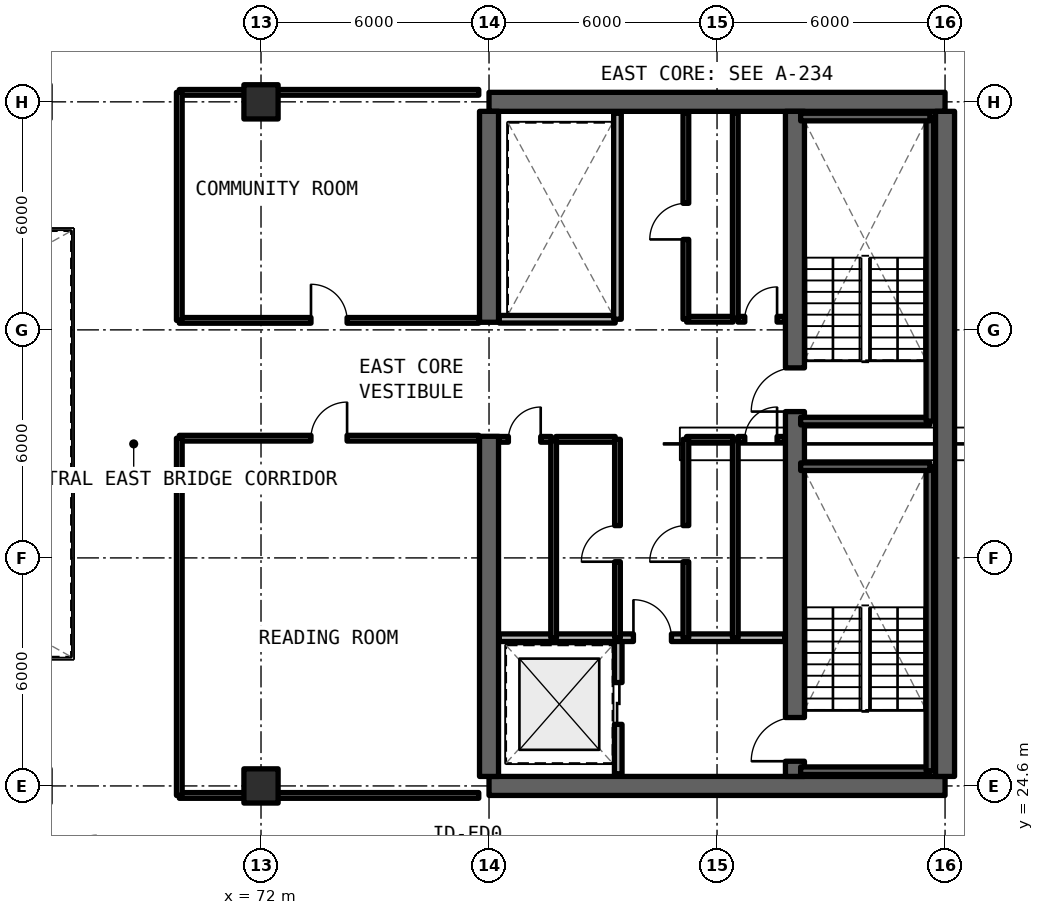
"""IFC4 building model, lengths in metres.
Left out: names, types, materials, properties, quantities, classifications, styles, units other than length and angle.
Written with IfcOpenShell. Run it as: python <this file> out.ifc"""

import sys

from ifc_helpers import new_model, si_unit, direction, frame, frame_2d, origin, origin_2d, place, context, subcontext, project, spatial, rectangle, extrude, element, fill, save


model = new_model("IFC4")
c1 = context("Model", 3, precision=1e-05, world=origin(), true_north=direction((0.0, 1.0)))
c2 = subcontext(c1, "Body", "Model", "MODEL_VIEW")
j1 = project(units=[si_unit("LENGTHUNIT", "METRE"), si_unit("PLANEANGLEUNIT", "RADIAN")], contexts=[c1])
p1 = place(None, origin())
s1 = spatial("IfcSite", under=j1, at=p1, CompositionType="ELEMENT")
p2 = place(p1, origin())
s2 = spatial("IfcBuilding", under=s1, at=p2, CompositionType="ELEMENT")
p3 = place(p2, frame((0.0, 0.0, 148.5)))
s3 = spatial("IfcBuildingStorey", under=s2, at=p3, CompositionType="ELEMENT", Elevation=148.5)
for number, where, z_axis, x_axis in (
    (1, (78.0, 24.6, 0.0), (0.0, 0.0, 1.0), (1.0, 0.0, 0.0)),
    (2, (90.0, 42.6, 0.0), (0.0, 0.0, 1.0), (-1.0, 0.0, 0.0)),
):
    element("IfcWall", number, at=place(p3, frame(where, z_axis=z_axis, x_axis=x_axis)), inside=s3, PredefinedType="SHEAR", context=c2, shape_type="SweptSolid", body=[
        extrude(rectangle(XDim=12.0, YDim=0.5, at=frame_2d((6.0, 0.0))), origin(), (0.0, 0.0, 1.0), 3.3),
    ])
p4 = place(p3, frame((90.0, 24.85, 0.0), z_axis=(0.0, 0.0, 1.0), x_axis=(0.0, 1.0, 0.0)))
e3 = element("IfcWall", 3, at=p4, inside=s3, PredefinedType="SHEAR", context=c2, shape_type="SweptSolid", body=[
    extrude(rectangle(XDim=17.5, YDim=0.5, at=frame_2d((8.75, 0.0))), origin(), (0.0, 0.0, 1.0), 3.3),
])
p5 = place(p3, frame((78.0, 24.85, 0.0), z_axis=(0.0, 0.0, 1.0), x_axis=(0.0, 1.0, 0.0)))
e4 = element("IfcWall", 4, at=p5, inside=s3, PredefinedType="SHEAR", context=c2, shape_type="SweptSolid", body=[
    extrude(rectangle(XDim=8.95, YDim=0.5, at=frame_2d((4.475, 0.0))), origin(), (0.0, 0.0, 1.0), 3.3),
])
p6 = place(p3, frame((78.0, 36.8, 0.0), z_axis=(0.0, 0.0, 1.0), x_axis=(0.0, 1.0, 0.0)))
e5 = element("IfcWall", 5, at=p6, inside=s3, PredefinedType="SHEAR", context=c2, shape_type="SweptSolid", body=[
    extrude(rectangle(XDim=5.55, YDim=0.5, at=frame_2d((2.775, 0.0))), origin(), (0.0, 0.0, 1.0), 3.3),
])
p7 = place(p3, frame((86.05, 24.85, 0.0), z_axis=(0.0, 0.0, 1.0), x_axis=(0.0, 1.0, 0.0)))
e6 = element("IfcWall", 6, at=p7, inside=s3, PredefinedType="SHEAR", context=c2, shape_type="SweptSolid", body=[
    extrude(rectangle(XDim=17.5, YDim=0.5, at=frame_2d((8.75, 0.0))), origin(), (0.0, 0.0, 1.0), 3.3),
])
p8 = place(p7, frame((0.4, 0.0, 0.0)))
e7 = element("IfcOpeningElement", 7, at=p8, cuts=e6, PredefinedType="OPENING", context=c2, shape_type="SweptSolid", body=[
    extrude(rectangle(XDim=1.15, YDim=2.15, at=frame_2d((0.575, 1.075))), frame((0.0, 0.26, 0.0), z_axis=(0.0, -1.0, 0.0), x_axis=(1.0, 0.0, 0.0)), (0.0, 0.0, 1.0), 0.52),
])
p9 = place(p7, frame((9.6, 0.0, 0.0)))
e8 = element("IfcOpeningElement", 8, at=p9, cuts=e6, PredefinedType="OPENING", context=c2, shape_type="SweptSolid", body=[
    extrude(rectangle(XDim=1.15, YDim=2.15, at=frame_2d((0.575, 1.075))), frame((0.0, 0.26, 0.0), z_axis=(0.0, -1.0, 0.0), x_axis=(1.0, 0.0, 0.0)), (0.0, 0.0, 1.0), 0.52),
])
for number, where, z_axis, x_axis in (
    (9, (72.0, 24.6, 0.0), (0.0, 0.0, 1.0), (1.0, 0.0, 0.0)),
    (10, (72.0, 42.6, 0.0), (0.0, 0.0, 1.0), (1.0, 0.0, 0.0)),
):
    element("IfcColumn", number, at=place(p3, frame(where, z_axis=z_axis, x_axis=x_axis)), inside=s3, PredefinedType="COLUMN", context=c2, shape_type="SweptSolid", body=[
        extrude(rectangle(XDim=0.9, YDim=0.9, at=origin_2d()), origin(), (0.0, 0.0, 1.0), 3.3),
    ])
p10 = place(p3, frame((81.4, 24.92, 0.0), z_axis=(0.0, 0.0, 1.0), x_axis=(0.0, 1.0, 0.0)))
e11 = element("IfcWall", 11, at=p10, inside=s3, PredefinedType="SOLIDWALL", context=c2, shape_type="SweptSolid", body=[
    extrude(rectangle(XDim=3.58, YDim=0.2, at=frame_2d((1.79, 0.0))), origin(), (0.0, 0.0, 1.0), 2.35),
])
p11 = place(p10, frame((1.3, 0.0, 0.0)))
e12 = element("IfcOpeningElement", 12, at=p11, cuts=e11, PredefinedType="OPENING", context=c2, shape_type="SweptSolid", body=[
    extrude(rectangle(XDim=1.1, YDim=2.2, at=frame_2d((0.55, 1.1))), frame((0.0, 0.11, 0.0), z_axis=(0.0, -1.0, 0.0), x_axis=(1.0, 0.0, 0.0)), (0.0, 0.0, 1.0), 0.22),
])
p12 = place(p3, frame((78.27, 28.5, 0.0), z_axis=(0.0, 0.0, 1.0), x_axis=(1.0, 0.0, 0.0)))
e13 = element("IfcWall", 13, at=p12, inside=s3, PredefinedType="SOLIDWALL", context=c2, shape_type="SweptSolid", body=[
    extrude(rectangle(XDim=7.51, YDim=0.2, at=frame_2d((3.755, 0.0))), origin(), (0.0, 0.0, 1.0), 2.35),
])
p13 = place(p12, frame((3.53, 0.0, 0.0)))
e14 = element("IfcOpeningElement", 14, at=p13, cuts=e13, PredefinedType="OPENING", context=c2, shape_type="SweptSolid", body=[
    extrude(rectangle(XDim=1.0, YDim=2.15, at=frame_2d((0.5, 1.075))), frame((0.0, 0.11, 0.0), z_axis=(0.0, -1.0, 0.0), x_axis=(1.0, 0.0, 0.0)), (0.0, 0.0, 1.0), 0.22),
])
p14 = place(p3, frame((84.48, 28.5, 0.0), z_axis=(0.0, 0.0, 1.0), x_axis=(0.0, 1.0, 0.0)))
e15 = element("IfcWall", 15, at=p14, inside=s3, PredefinedType="SOLIDWALL", context=c2, shape_type="SweptSolid", body=[
    extrude(rectangle(XDim=5.22, YDim=0.15, at=frame_2d((2.61, 0.0))), origin(), (0.0, 0.0, 1.0), 2.35),
])
p15 = place(p3, frame((84.55, 33.72, 0.0), z_axis=(0.0, 0.0, 1.0), x_axis=(1.0, 0.0, 0.0)))
e16 = element("IfcWall", 16, at=p15, inside=s3, PredefinedType="SOLIDWALL", context=c2, shape_type="SweptSolid", body=[
    extrude(rectangle(XDim=1.23, YDim=0.15, at=frame_2d((0.615, 0.0))), origin(), (0.0, 0.0, 1.0), 2.35),
])
p16 = place(p15, frame((0.18, 0.0, 0.0)))
e17 = element("IfcOpeningElement", 17, at=p16, cuts=e16, PredefinedType="OPENING", context=c2, shape_type="SweptSolid", body=[
    extrude(rectangle(XDim=0.85, YDim=2.1, at=frame_2d((0.425, 1.05))), frame((0.0, 0.085, 0.0), z_axis=(0.0, -1.0, 0.0), x_axis=(1.0, 0.0, 0.0)), (0.0, 0.0, 1.0), 0.17),
])
p17 = place(p3, frame((83.2, 33.72, 0.0), z_axis=(0.0, 0.0, 1.0), x_axis=(1.0, 0.0, 0.0)))
e18 = element("IfcWall", 18, at=p17, inside=s3, PredefinedType="SOLIDWALL", context=c2, shape_type="SweptSolid", body=[
    extrude(rectangle(XDim=1.22, YDim=0.15, at=frame_2d((0.61, 0.0))), origin(), (0.0, 0.0, 1.0), 2.35),
])
p18 = place(p3, frame((83.18, 28.5, 0.0), z_axis=(0.0, 0.0, 1.0), x_axis=(0.0, 1.0, 0.0)))
e19 = element("IfcWall", 19, at=p18, inside=s3, PredefinedType="SOLIDWALL", context=c2, shape_type="SweptSolid", body=[
    extrude(rectangle(XDim=5.22, YDim=0.15, at=frame_2d((2.61, 0.0))), origin(), (0.0, 0.0, 1.0), 2.35),
])
p19 = place(p18, frame((2.0, 0.0, 0.0)))
e20 = element("IfcOpeningElement", 20, at=p19, cuts=e19, PredefinedType="OPENING", context=c2, shape_type="SweptSolid", body=[
    extrude(rectangle(XDim=0.95, YDim=2.15, at=frame_2d((0.475, 1.075))), frame((0.0, 0.085, 0.0), z_axis=(0.0, -1.0, 0.0), x_axis=(1.0, 0.0, 0.0)), (0.0, 0.0, 1.0), 0.17),
])
p20 = place(p3, frame((79.7, 28.5, 0.0), z_axis=(0.0, 0.0, 1.0), x_axis=(0.0, 1.0, 0.0)))
e21 = element("IfcWall", 21, at=p20, inside=s3, PredefinedType="SOLIDWALL", context=c2, shape_type="SweptSolid", body=[
    extrude(rectangle(XDim=5.22, YDim=0.15, at=frame_2d((2.61, 0.0))), origin(), (0.0, 0.0, 1.0), 2.35),
])
p21 = place(p3, frame((79.76, 33.72, 0.0), z_axis=(0.0, 0.0, 1.0), x_axis=(1.0, 0.0, 0.0)))
e22 = element("IfcWall", 22, at=p21, inside=s3, PredefinedType="SOLIDWALL", context=c2, shape_type="SweptSolid", body=[
    extrude(rectangle(XDim=1.56, YDim=0.15, at=frame_2d((0.78, 0.0))), origin(), (0.0, 0.0, 1.0), 2.35),
])
p22 = place(p3, frame((78.27, 33.72, 0.0), z_axis=(0.0, 0.0, 1.0), x_axis=(1.0, 0.0, 0.0)))
e23 = element("IfcWall", 23, at=p22, inside=s3, PredefinedType="SOLIDWALL", context=c2, shape_type="SweptSolid", body=[
    extrude(rectangle(XDim=1.37, YDim=0.15, at=frame_2d((0.685, 0.0))), origin(), (0.0, 0.0, 1.0), 2.35),
])
p23 = place(p22, frame((0.24, 0.0, 0.0)))
e24 = element("IfcOpeningElement", 24, at=p23, cuts=e23, PredefinedType="OPENING", context=c2, shape_type="SweptSolid", body=[
    extrude(rectangle(XDim=0.85, YDim=2.1, at=frame_2d((0.425, 1.05))), frame((0.0, 0.085, 0.0), z_axis=(0.0, -1.0, 0.0), x_axis=(1.0, 0.0, 0.0)), (0.0, 0.0, 1.0), 0.17),
])
p24 = place(p3, frame((81.38, 28.5, 0.0), z_axis=(0.0, 0.0, 1.0), x_axis=(0.0, 1.0, 0.0)))
e25 = element("IfcWall", 25, at=p24, inside=s3, PredefinedType="SOLIDWALL", context=c2, shape_type="SweptSolid", body=[
    extrude(rectangle(XDim=5.22, YDim=0.15, at=frame_2d((2.61, 0.0))), origin(), (0.0, 0.0, 1.0), 2.35),
])
p25 = place(p24, frame((2.0, 0.0, 0.0)))
e26 = element("IfcOpeningElement", 26, at=p25, cuts=e25, PredefinedType="OPENING", context=c2, shape_type="SweptSolid", body=[
    extrude(rectangle(XDim=0.95, YDim=2.15, at=frame_2d((0.475, 1.075))), frame((0.0, 0.085, 0.0), z_axis=(0.0, -1.0, 0.0), x_axis=(1.0, 0.0, 0.0)), (0.0, 0.0, 1.0), 0.17),
])
p26 = place(p3, frame((84.48, 36.88, 0.0), z_axis=(0.0, 0.0, 1.0), x_axis=(0.0, 1.0, 0.0)))
e27 = element("IfcWall", 27, at=p26, inside=s3, PredefinedType="SOLIDWALL", context=c2, shape_type="SweptSolid", body=[
    extrude(rectangle(XDim=5.42, YDim=0.15, at=frame_2d((2.71, 0.0))), origin(), (0.0, 0.0, 1.0), 2.35),
])
p27 = place(p3, frame((84.55, 36.88, 0.0), z_axis=(0.0, 0.0, 1.0), x_axis=(1.0, 0.0, 0.0)))
e28 = element("IfcWall", 28, at=p27, inside=s3, PredefinedType="SOLIDWALL", context=c2, shape_type="SweptSolid", body=[
    extrude(rectangle(XDim=1.23, YDim=0.15, at=frame_2d((0.615, 0.0))), origin(), (0.0, 0.0, 1.0), 2.35),
])
p28 = place(p27, frame((0.18, 0.0, 0.0)))
e29 = element("IfcOpeningElement", 29, at=p28, cuts=e28, PredefinedType="OPENING", context=c2, shape_type="SweptSolid", body=[
    extrude(rectangle(XDim=0.85, YDim=2.1, at=frame_2d((0.425, 1.05))), frame((0.0, 0.085, 0.0), z_axis=(0.0, -1.0, 0.0), x_axis=(1.0, 0.0, 0.0)), (0.0, 0.0, 1.0), 0.17),
])
p29 = place(p3, frame((83.2, 36.88, 0.0), z_axis=(0.0, 0.0, 1.0), x_axis=(1.0, 0.0, 0.0)))
e30 = element("IfcWall", 30, at=p29, inside=s3, PredefinedType="SOLIDWALL", context=c2, shape_type="SweptSolid", body=[
    extrude(rectangle(XDim=1.22, YDim=0.15, at=frame_2d((0.61, 0.0))), origin(), (0.0, 0.0, 1.0), 2.35),
])
p30 = place(p3, frame((83.18, 36.88, 0.0), z_axis=(0.0, 0.0, 1.0), x_axis=(0.0, 1.0, 0.0)))
e31 = element("IfcWall", 31, at=p30, inside=s3, PredefinedType="SOLIDWALL", context=c2, shape_type="SweptSolid", body=[
    extrude(rectangle(XDim=5.42, YDim=0.15, at=frame_2d((2.71, 0.0))), origin(), (0.0, 0.0, 1.0), 2.35),
])
p31 = place(p30, frame((2.1, 0.0, 0.0)))
e32 = element("IfcOpeningElement", 32, at=p31, cuts=e31, PredefinedType="OPENING", context=c2, shape_type="SweptSolid", body=[
    extrude(rectangle(XDim=0.95, YDim=2.15, at=frame_2d((0.475, 1.075))), frame((0.0, 0.085, 0.0), z_axis=(0.0, -1.0, 0.0), x_axis=(1.0, 0.0, 0.0)), (0.0, 0.0, 1.0), 0.17),
])
p32 = place(p3, frame((78.27, 36.88, 0.0), z_axis=(0.0, 0.0, 1.0), x_axis=(1.0, 0.0, 0.0)))
e33 = element("IfcWall", 33, at=p32, inside=s3, PredefinedType="SOLIDWALL", context=c2, shape_type="SweptSolid", body=[
    extrude(rectangle(XDim=3.05, YDim=0.2, at=frame_2d((1.525, 0.0))), origin(), (0.0, 0.0, 1.0), 2.35),
])
p33 = place(p3, frame((81.38, 36.88, 0.0), z_axis=(0.0, 0.0, 1.0), x_axis=(0.0, 1.0, 0.0)))
e34 = element("IfcWall", 34, at=p33, inside=s3, PredefinedType="SOLIDWALL", context=c2, shape_type="SweptSolid", body=[
    extrude(rectangle(XDim=5.42, YDim=0.2, at=frame_2d((2.71, 0.0))), origin(), (0.0, 0.0, 1.0), 2.35),
])
p34 = place(p3, frame((69.85, 24.35, 0.0), z_axis=(0.0, 0.0, 1.0), x_axis=(1.0, 0.0, 0.0)))
e35 = element("IfcWall", 35, at=p34, inside=s3, PredefinedType="SOLIDWALL", context=c2, shape_type="SweptSolid", body=[
    extrude(rectangle(XDim=7.88, YDim=0.15, at=frame_2d((3.94, 0.0))), origin(), (0.0, 0.0, 1.0), 2.35),
])
p35 = place(p3, frame((69.85, 33.75, 0.0), z_axis=(0.0, 0.0, 1.0), x_axis=(1.0, 0.0, 0.0)))
e36 = element("IfcWall", 36, at=p35, inside=s3, PredefinedType="SOLIDWALL", context=c2, shape_type="SweptSolid", body=[
    extrude(rectangle(XDim=7.88, YDim=0.15, at=frame_2d((3.94, 0.0))), origin(), (0.0, 0.0, 1.0), 2.35),
])
p36 = place(p35, frame((3.465, 0.0, 0.0)))
e37 = element("IfcOpeningElement", 37, at=p36, cuts=e36, PredefinedType="OPENING", context=c2, shape_type="SweptSolid", body=[
    extrude(rectangle(XDim=0.95, YDim=2.15, at=frame_2d((0.475, 1.075))), frame((0.0, 0.085, 0.0), z_axis=(0.0, -1.0, 0.0), x_axis=(1.0, 0.0, 0.0)), (0.0, 0.0, 1.0), 0.17),
])
p37 = place(p3, frame((69.85, 24.35, 0.0), z_axis=(0.0, 0.0, 1.0), x_axis=(0.0, 1.0, 0.0)))
e38 = element("IfcWall", 38, at=p37, inside=s3, PredefinedType="SOLIDWALL", context=c2, shape_type="SweptSolid", body=[
    extrude(rectangle(XDim=9.4, YDim=0.15, at=frame_2d((4.7, 0.0))), origin(), (0.0, 0.0, 1.0), 2.35),
])
p38 = place(p3, frame((69.85, 36.85, 0.0), z_axis=(0.0, 0.0, 1.0), x_axis=(1.0, 0.0, 0.0)))
e39 = element("IfcWall", 39, at=p38, inside=s3, PredefinedType="SOLIDWALL", context=c2, shape_type="SweptSolid", body=[
    extrude(rectangle(XDim=7.88, YDim=0.15, at=frame_2d((3.94, 0.0))), origin(), (0.0, 0.0, 1.0), 2.35),
])
p39 = place(p38, frame((3.465, 0.0, 0.0)))
e40 = element("IfcOpeningElement", 40, at=p39, cuts=e39, PredefinedType="OPENING", context=c2, shape_type="SweptSolid", body=[
    extrude(rectangle(XDim=0.95, YDim=2.15, at=frame_2d((0.475, 1.075))), frame((0.0, 0.085, 0.0), z_axis=(0.0, -1.0, 0.0), x_axis=(1.0, 0.0, 0.0)), (0.0, 0.0, 1.0), 0.17),
])
p40 = place(p3, frame((69.85, 42.85, 0.0), z_axis=(0.0, 0.0, 1.0), x_axis=(1.0, 0.0, 0.0)))
e41 = element("IfcWall", 41, at=p40, inside=s3, PredefinedType="SOLIDWALL", context=c2, shape_type="SweptSolid", body=[
    extrude(rectangle(XDim=7.88, YDim=0.15, at=frame_2d((3.94, 0.0))), origin(), (0.0, 0.0, 1.0), 2.35),
])
p41 = place(p3, frame((69.85, 36.85, 0.0), z_axis=(0.0, 0.0, 1.0), x_axis=(0.0, 1.0, 0.0)))
e42 = element("IfcWall", 42, at=p41, inside=s3, PredefinedType="SOLIDWALL", context=c2, shape_type="SweptSolid", body=[
    extrude(rectangle(XDim=6.0, YDim=0.15, at=frame_2d((3.0, 0.0))), origin(), (0.0, 0.0, 1.0), 2.35),
])
p42 = place(p3, frame((86.2, 25.0, 0.0), z_axis=(0.0, 0.0, 1.0), x_axis=(1.0, 0.0, 0.0)))
e43 = element("IfcWall", 43, at=p42, inside=s3, PredefinedType="SOLIDWALL", context=c2, shape_type="SweptSolid", body=[
    extrude(rectangle(XDim=3.4, YDim=0.2, at=frame_2d((1.7, 0.0))), origin(), (0.0, 0.0, 1.0), 3.3),
])
p43 = place(p3, frame((89.6, 25.0, 0.0), z_axis=(0.0, 0.0, 1.0), x_axis=(0.0, 1.0, 0.0)))
e44 = element("IfcWall", 44, at=p43, inside=s3, PredefinedType="SOLIDWALL", context=c2, shape_type="SweptSolid", body=[
    extrude(rectangle(XDim=8.0, YDim=0.2, at=frame_2d((4.0, 0.0))), origin(), (0.0, 0.0, 1.0), 3.3),
])
for number, where, z_axis, x_axis in (
    (45, (89.6, 33.0, 0.0), (0.0, 0.0, 1.0), (-1.0, 0.0, 0.0)),
    (46, (86.2, 34.2, 0.0), (0.0, 0.0, 1.0), (1.0, 0.0, 0.0)),
):
    element("IfcWall", number, at=place(p3, frame(where, z_axis=z_axis, x_axis=x_axis)), inside=s3, PredefinedType="SOLIDWALL", context=c2, shape_type="SweptSolid", body=[
        extrude(rectangle(XDim=3.4, YDim=0.2, at=frame_2d((1.7, 0.0))), origin(), (0.0, 0.0, 1.0), 3.3),
    ])
p44 = place(p3, frame((89.6, 34.2, 0.0), z_axis=(0.0, 0.0, 1.0), x_axis=(0.0, 1.0, 0.0)))
e47 = element("IfcWall", 47, at=p44, inside=s3, PredefinedType="SOLIDWALL", context=c2, shape_type="SweptSolid", body=[
    extrude(rectangle(XDim=8.0, YDim=0.2, at=frame_2d((4.0, 0.0))), origin(), (0.0, 0.0, 1.0), 3.3),
])
p45 = place(p3, frame((89.6, 42.2, 0.0), z_axis=(0.0, 0.0, 1.0), x_axis=(-1.0, 0.0, 0.0)))
e48 = element("IfcWall", 48, at=p45, inside=s3, PredefinedType="SOLIDWALL", context=c2, shape_type="SweptSolid", body=[
    extrude(rectangle(XDim=3.4, YDim=0.2, at=frame_2d((1.7, 0.0))), origin(), (0.0, 0.0, 1.0), 3.3),
])
p46 = place(p11, origin())
e49 = element("IfcDoor", 49, at=p46, inside=s3, OperationType="SLIDING_TO_LEFT", PredefinedType="DOOR", context=c2, shape_type="SweptSolid", body=[
    extrude(rectangle(XDim=1.1, YDim=2.2, at=frame_2d((0.55, 1.1))), frame((0.0, 0.025, 0.0), z_axis=(0.0, -1.0, 0.0), x_axis=(1.0, 0.0, 0.0)), (0.0, 0.0, 1.0), 0.05),
])
fill(e12, e49)
p47 = place(p13, origin())
e50 = element("IfcDoor", 50, at=p47, inside=s3, OperationType="SINGLE_SWING_LEFT", PredefinedType="DOOR", context=c2, shape_type="SweptSolid", body=[
    extrude(rectangle(XDim=1.0, YDim=2.15, at=frame_2d((0.5, 1.075))), frame((0.0, 0.025, 0.0), z_axis=(0.0, -1.0, 0.0), x_axis=(1.0, 0.0, 0.0)), (0.0, 0.0, 1.0), 0.05),
])
fill(e14, e50)
p48 = place(p16, origin())
e51 = element("IfcDoor", 51, at=p48, inside=s3, OperationType="SINGLE_SWING_RIGHT", PredefinedType="DOOR", context=c2, shape_type="SweptSolid", body=[
    extrude(rectangle(XDim=0.85, YDim=2.1, at=frame_2d((0.425, 1.05))), frame((0.0, 0.025, 0.0), z_axis=(0.0, -1.0, 0.0), x_axis=(1.0, 0.0, 0.0)), (0.0, 0.0, 1.0), 0.05),
])
fill(e17, e51)
p49 = place(p19, origin())
e52 = element("IfcDoor", 52, at=p49, inside=s3, OperationType="SINGLE_SWING_LEFT", PredefinedType="DOOR", context=c2, shape_type="SweptSolid", body=[
    extrude(rectangle(XDim=0.95, YDim=2.15, at=frame_2d((0.475, 1.075))), frame((0.0, 0.025, 0.0), z_axis=(0.0, -1.0, 0.0), x_axis=(1.0, 0.0, 0.0)), (0.0, 0.0, 1.0), 0.05),
])
fill(e20, e52)
p50 = place(p23, origin())
e53 = element("IfcDoor", 53, at=p50, inside=s3, OperationType="SINGLE_SWING_RIGHT", PredefinedType="DOOR", context=c2, shape_type="SweptSolid", body=[
    extrude(rectangle(XDim=0.85, YDim=2.1, at=frame_2d((0.425, 1.05))), frame((0.0, 0.025, 0.0), z_axis=(0.0, -1.0, 0.0), x_axis=(1.0, 0.0, 0.0)), (0.0, 0.0, 1.0), 0.05),
])
fill(e24, e53)
p51 = place(p25, origin())
e54 = element("IfcDoor", 54, at=p51, inside=s3, OperationType="SINGLE_SWING_LEFT", PredefinedType="DOOR", context=c2, shape_type="SweptSolid", body=[
    extrude(rectangle(XDim=0.95, YDim=2.15, at=frame_2d((0.475, 1.075))), frame((0.0, 0.025, 0.0), z_axis=(0.0, -1.0, 0.0), x_axis=(1.0, 0.0, 0.0)), (0.0, 0.0, 1.0), 0.05),
])
fill(e26, e54)
p52 = place(p28, origin())
e55 = element("IfcDoor", 55, at=p52, inside=s3, OperationType="SINGLE_SWING_RIGHT", PredefinedType="DOOR", context=c2, shape_type="SweptSolid", body=[
    extrude(rectangle(XDim=0.85, YDim=2.1, at=frame_2d((0.425, 1.05))), frame((0.0, 0.025, 0.0), z_axis=(0.0, -1.0, 0.0), x_axis=(1.0, 0.0, 0.0)), (0.0, 0.0, 1.0), 0.05),
])
fill(e29, e55)
p53 = place(p31, origin())
e56 = element("IfcDoor", 56, at=p53, inside=s3, OperationType="SINGLE_SWING_LEFT", PredefinedType="DOOR", context=c2, shape_type="SweptSolid", body=[
    extrude(rectangle(XDim=0.95, YDim=2.15, at=frame_2d((0.475, 1.075))), frame((0.0, 0.025, 0.0), z_axis=(0.0, -1.0, 0.0), x_axis=(1.0, 0.0, 0.0)), (0.0, 0.0, 1.0), 0.05),
])
fill(e32, e56)
p54 = place(p36, origin())
e57 = element("IfcDoor", 57, at=p54, inside=s3, OperationType="SINGLE_SWING_RIGHT", PredefinedType="DOOR", context=c2, shape_type="SweptSolid", body=[
    extrude(rectangle(XDim=0.95, YDim=2.15, at=frame_2d((0.475, 1.075))), frame((0.0, 0.025, 0.0), z_axis=(0.0, -1.0, 0.0), x_axis=(1.0, 0.0, 0.0)), (0.0, 0.0, 1.0), 0.05),
])
fill(e37, e57)
p55 = place(p39, origin())
e58 = element("IfcDoor", 58, at=p55, inside=s3, OperationType="SINGLE_SWING_LEFT", PredefinedType="DOOR", context=c2, shape_type="SweptSolid", body=[
    extrude(rectangle(XDim=0.95, YDim=2.15, at=frame_2d((0.475, 1.075))), frame((0.0, 0.025, 0.0), z_axis=(0.0, -1.0, 0.0), x_axis=(1.0, 0.0, 0.0)), (0.0, 0.0, 1.0), 0.05),
])
fill(e40, e58)
p56 = place(p8, origin())
e59 = element("IfcDoor", 59, at=p56, inside=s3, OperationType="SINGLE_SWING_LEFT", PredefinedType="DOOR", context=c2, shape_type="SweptSolid", body=[
    extrude(rectangle(XDim=1.15, YDim=2.15, at=frame_2d((0.575, 1.075))), frame((0.0, 0.025, 0.0), z_axis=(0.0, -1.0, 0.0), x_axis=(1.0, 0.0, 0.0)), (0.0, 0.0, 1.0), 0.05),
])
fill(e7, e59)
p57 = place(p9, origin())
e60 = element("IfcDoor", 60, at=p57, inside=s3, OperationType="SINGLE_SWING_RIGHT", PredefinedType="DOOR", context=c2, shape_type="SweptSolid", body=[
    extrude(rectangle(XDim=1.15, YDim=2.15, at=frame_2d((0.575, 1.075))), frame((0.0, 0.025, 0.0), z_axis=(0.0, -1.0, 0.0), x_axis=(1.0, 0.0, 0.0)), (0.0, 0.0, 1.0), 0.05),
])
fill(e8, e60)
save(model, sys.argv[1])
